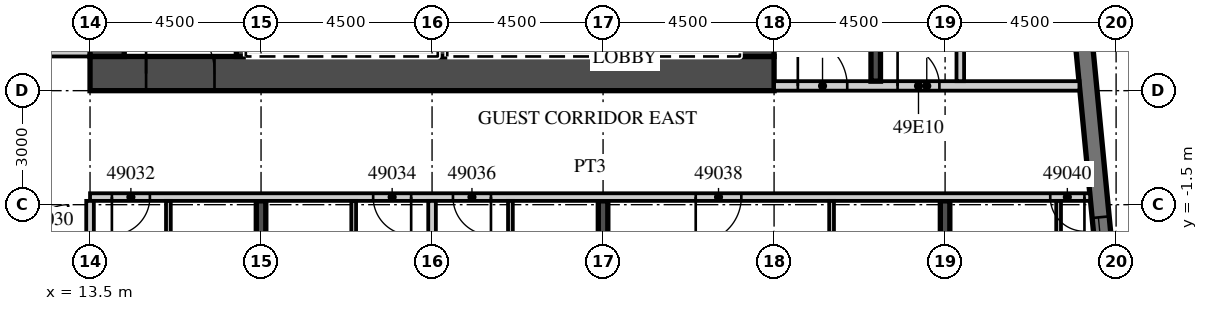
"""IFC4 building model, lengths in metres.
Left out: names, types, materials, properties, quantities, classifications, styles, units other than length and angle.
Written with IfcOpenShell. Run it as: python <this file> out.ifc"""

import sys

from ifc_helpers import new_model, si_unit, direction, frame, frame_2d, origin, place, context, subcontext, project, spatial, rectangle, extrude, element, fill, save


model = new_model("IFC4")
c1 = context("Model", 3, precision=1e-05, world=origin(), true_north=direction((0.0, 1.0)))
c2 = subcontext(c1, "Body", "Model", "MODEL_VIEW")
j1 = project(units=[si_unit("LENGTHUNIT", "METRE"), si_unit("PLANEANGLEUNIT", "RADIAN")], contexts=[c1])
p1 = place(None, origin())
s1 = spatial("IfcSite", under=j1, at=p1, CompositionType="ELEMENT")
p2 = place(p1, origin())
s2 = spatial("IfcBuilding", under=s1, at=p2, CompositionType="ELEMENT")
p3 = place(p2, frame((0.0, 0.0, 203.2)))
s3 = spatial("IfcBuildingStorey", under=s2, at=p3, CompositionType="ELEMENT", Elevation=203.2)
p4 = place(p3, frame((18.0, -19.245, 0.0), z_axis=(0.0, 0.0, 1.0), x_axis=(0.0, 1.0, 0.0)))
e1 = element("IfcWall", 1, at=p4, inside=s3, PredefinedType="SHEAR", context=c2, shape_type="SweptSolid", body=[
    extrude(rectangle(XDim=17.845, YDim=0.25, at=frame_2d((8.923, 0.0))), origin(), (0.0, 0.0, 1.0), 3.0),
])
p5 = place(p3, frame((27.0, -18.379, 0.0), z_axis=(0.0, 0.0, 1.0), x_axis=(0.0, 1.0, 0.0)))
e2 = element("IfcWall", 2, at=p5, inside=s3, PredefinedType="SHEAR", context=c2, shape_type="SweptSolid", body=[
    extrude(rectangle(XDim=16.979, YDim=0.25, at=frame_2d((8.489, 0.0))), origin(), (0.0, 0.0, 1.0), 3.0),
])
p6 = place(p3, frame((36.0, -17.512, 0.0), z_axis=(0.0, 0.0, 1.0), x_axis=(0.0, 1.0, 0.0)))
e3 = element("IfcWall", 3, at=p6, inside=s3, PredefinedType="SHEAR", context=c2, shape_type="SweptSolid", body=[
    extrude(rectangle(XDim=16.112, YDim=0.25, at=frame_2d((8.056, 0.0))), origin(), (0.0, 0.0, 1.0), 3.0),
])
p7 = place(p3, frame((41.214, -13.466, 0.0), z_axis=(0.0, 0.0, 1.0), x_axis=(-0.095847314626, 0.995396047952, 0.0)))
e4 = element("IfcWall", 4, at=p7, inside=s3, PredefinedType="SOLIDWALL", context=c2, shape_type="SweptSolid", body=[
    extrude(rectangle(XDim=34.0, YDim=0.45, at=frame_2d((17.0, 0.0))), origin(), (0.0, 0.0, 1.0), 3.0),
])
p8 = place(p7, frame((3.869, 0.0, 0.45)))
e5 = element("IfcOpeningElement", 5, at=p8, cuts=e4, PredefinedType="OPENING", context=c2, shape_type="SweptSolid", body=[
    extrude(rectangle(XDim=3.3, YDim=2.25, at=frame_2d((1.65, 1.125))), frame((0.0, 0.235, 0.0), z_axis=(0.0, -1.0, 0.0), x_axis=(1.0, 0.0, 0.0)), (0.0, 0.0, 1.0), 0.47),
])
p9 = place(p7, frame((8.39, 0.0, 0.45)))
e6 = element("IfcOpeningElement", 6, at=p9, cuts=e4, PredefinedType="OPENING", context=c2, shape_type="SweptSolid", body=[
    extrude(rectangle(XDim=3.3, YDim=2.25, at=frame_2d((1.65, 1.125))), frame((0.0, 0.235, 0.0), z_axis=(0.0, -1.0, 0.0), x_axis=(1.0, 0.0, 0.0)), (0.0, 0.0, 1.0), 0.47),
])
p10 = place(p3, frame((-13.5, 2.5, 0.0), z_axis=(0.0, 0.0, 1.0), x_axis=(1.0, 0.0, 0.0)))
e7 = element("IfcWall", 7, at=p10, inside=s3, PredefinedType="PARTITIONING", context=c2, shape_type="SweptSolid", body=[
    extrude(rectangle(XDim=27.0, YDim=0.2, at=frame_2d((13.5, 0.0))), origin(), (0.0, 0.0, 1.0), 3.0),
])
p11 = place(p10, frame((2.925, 0.0, 0.0)))
e8 = element("IfcOpeningElement", 8, at=p11, cuts=e7, PredefinedType="OPENING", context=c2, shape_type="SweptSolid", body=[
    extrude(rectangle(XDim=1.0, YDim=2.1, at=frame_2d((0.5, 1.05))), frame((0.0, 0.11, 0.0), z_axis=(0.0, -1.0, 0.0), x_axis=(1.0, 0.0, 0.0)), (0.0, 0.0, 1.0), 0.22),
])
p12 = place(p10, frame((9.863, 0.0, 0.0)))
e9 = element("IfcOpeningElement", 9, at=p12, cuts=e7, PredefinedType="OPENING", context=c2, shape_type="SweptSolid", body=[
    extrude(rectangle(XDim=1.2, YDim=2.1, at=frame_2d((0.6, 1.05))), frame((0.0, 0.11, 0.0), z_axis=(0.0, -1.0, 0.0), x_axis=(1.0, 0.0, 0.0)), (0.0, 0.0, 1.0), 0.22),
])
p13 = place(p10, frame((15.938, 0.0, 0.0)))
e10 = element("IfcOpeningElement", 10, at=p13, cuts=e7, PredefinedType="OPENING", context=c2, shape_type="SweptSolid", body=[
    extrude(rectangle(XDim=1.2, YDim=2.1, at=frame_2d((0.6, 1.05))), frame((0.0, 0.11, 0.0), z_axis=(0.0, -1.0, 0.0), x_axis=(1.0, 0.0, 0.0)), (0.0, 0.0, 1.0), 0.22),
])
p14 = place(p10, frame((23.075, 0.0, 0.0)))
e11 = element("IfcOpeningElement", 11, at=p14, cuts=e7, PredefinedType="OPENING", context=c2, shape_type="SweptSolid", body=[
    extrude(rectangle(XDim=1.0, YDim=2.1, at=frame_2d((0.5, 1.05))), frame((0.0, 0.11, 0.0), z_axis=(0.0, -1.0, 0.0), x_axis=(1.0, 0.0, 0.0)), (0.0, 0.0, 1.0), 0.22),
])
p15 = place(p3, frame((13.5, -1.3, 0.0), z_axis=(0.0, 0.0, 1.0), x_axis=(1.0, 0.0, 0.0)))
e12 = element("IfcWall", 12, at=p15, inside=s3, PredefinedType="PARTITIONING", context=c2, shape_type="SweptSolid", body=[
    extrude(rectangle(XDim=26.317, YDim=0.2, at=frame_2d((13.158, 0.0))), origin(), (0.0, 0.0, 1.0), 3.0),
])
p16 = place(p15, frame((0.575, 0.0, 0.0)))
e13 = element("IfcOpeningElement", 13, at=p16, cuts=e12, PredefinedType="OPENING", context=c2, shape_type="SweptSolid", body=[
    extrude(rectangle(XDim=1.0, YDim=2.1, at=frame_2d((0.5, 1.05))), frame((0.0, 0.11, 0.0), z_axis=(0.0, -1.0, 0.0), x_axis=(1.0, 0.0, 0.0)), (0.0, 0.0, 1.0), 0.22),
])
p17 = place(p15, frame((7.45, 0.0, 0.0)))
e14 = element("IfcOpeningElement", 14, at=p17, cuts=e12, PredefinedType="OPENING", context=c2, shape_type="SweptSolid", body=[
    extrude(rectangle(XDim=1.0, YDim=2.1, at=frame_2d((0.5, 1.05))), frame((0.0, 0.11, 0.0), z_axis=(0.0, -1.0, 0.0), x_axis=(1.0, 0.0, 0.0)), (0.0, 0.0, 1.0), 0.22),
])
p18 = place(p15, frame((9.55, 0.0, 0.0)))
e15 = element("IfcOpeningElement", 15, at=p18, cuts=e12, PredefinedType="OPENING", context=c2, shape_type="SweptSolid", body=[
    extrude(rectangle(XDim=1.0, YDim=2.1, at=frame_2d((0.5, 1.05))), frame((0.0, 0.11, 0.0), z_axis=(0.0, -1.0, 0.0), x_axis=(1.0, 0.0, 0.0)), (0.0, 0.0, 1.0), 0.22),
])
p19 = place(p15, frame((15.938, 0.0, 0.0)))
e16 = element("IfcOpeningElement", 16, at=p19, cuts=e12, PredefinedType="OPENING", context=c2, shape_type="SweptSolid", body=[
    extrude(rectangle(XDim=1.2, YDim=2.1, at=frame_2d((0.6, 1.05))), frame((0.0, 0.11, 0.0), z_axis=(0.0, -1.0, 0.0), x_axis=(1.0, 0.0, 0.0)), (0.0, 0.0, 1.0), 0.22),
])
p20 = place(p15, frame((25.267, 0.0, 0.0)))
e17 = element("IfcOpeningElement", 17, at=p20, cuts=e12, PredefinedType="OPENING", context=c2, shape_type="SweptSolid", body=[
    extrude(rectangle(XDim=0.9, YDim=2.1, at=frame_2d((0.45, 1.05))), frame((0.0, 0.11, 0.0), z_axis=(0.0, -1.0, 0.0), x_axis=(1.0, 0.0, 0.0)), (0.0, 0.0, 1.0), 0.22),
])
p21 = place(p3, frame((13.5, -19.701, 0.0), z_axis=(0.0, 0.0, 1.0), x_axis=(0.0, 1.0, 0.0)))
e18 = element("IfcWall", 18, at=p21, inside=s3, PredefinedType="PARTITIONING", context=c2, shape_type="SweptSolid", body=[
    extrude(rectangle(XDim=18.301, YDim=0.2, at=frame_2d((9.15, 0.0))), origin(), (0.0, 0.0, 1.0), 3.0),
])
p22 = place(p3, frame((15.562, -9.125, 0.0), z_axis=(0.0, 0.0, 1.0), x_axis=(0.0, 1.0, 0.0)))
e19 = element("IfcWall", 19, at=p22, inside=s3, PredefinedType="PARTITIONING", context=c2, shape_type="SweptSolid", body=[
    extrude(rectangle(XDim=7.725, YDim=0.125, at=frame_2d((3.863, 0.0))), origin(), (0.0, 0.0, 1.0), 3.0),
])
p23 = place(p22, frame((4.375, 0.0, 0.0)))
e20 = element("IfcOpeningElement", 20, at=p23, cuts=e19, PredefinedType="OPENING", context=c2, shape_type="SweptSolid", body=[
    extrude(rectangle(XDim=0.9, YDim=2.1, at=frame_2d((0.45, 1.05))), frame((0.0, 0.073, 0.0), z_axis=(0.0, -1.0, 0.0), x_axis=(1.0, 0.0, 0.0)), (0.0, 0.0, 1.0), 0.145),
])
p24 = place(p3, frame((22.5, -18.834, 0.0), z_axis=(0.0, 0.0, 1.0), x_axis=(0.0, 1.0, 0.0)))
e21 = element("IfcWall", 21, at=p24, inside=s3, PredefinedType="PARTITIONING", context=c2, shape_type="SweptSolid", body=[
    extrude(rectangle(XDim=17.434, YDim=0.2, at=frame_2d((8.717, 0.0))), origin(), (0.0, 0.0, 1.0), 3.0),
])
p25 = place(p3, frame((20.438, -9.125, 0.0), z_axis=(0.0, 0.0, 1.0), x_axis=(0.0, 1.0, 0.0)))
e22 = element("IfcWall", 22, at=p25, inside=s3, PredefinedType="PARTITIONING", context=c2, shape_type="SweptSolid", body=[
    extrude(rectangle(XDim=7.725, YDim=0.125, at=frame_2d((3.863, 0.0))), origin(), (0.0, 0.0, 1.0), 3.0),
])
p26 = place(p25, frame((4.375, 0.0, 0.0)))
e23 = element("IfcOpeningElement", 23, at=p26, cuts=e22, PredefinedType="OPENING", context=c2, shape_type="SweptSolid", body=[
    extrude(rectangle(XDim=0.9, YDim=2.1, at=frame_2d((0.45, 1.05))), frame((0.0, 0.073, 0.0), z_axis=(0.0, -1.0, 0.0), x_axis=(1.0, 0.0, 0.0)), (0.0, 0.0, 1.0), 0.145),
])
p27 = place(p3, frame((24.562, -9.125, 0.0), z_axis=(0.0, 0.0, 1.0), x_axis=(0.0, 1.0, 0.0)))
e24 = element("IfcWall", 24, at=p27, inside=s3, PredefinedType="PARTITIONING", context=c2, shape_type="SweptSolid", body=[
    extrude(rectangle(XDim=7.725, YDim=0.125, at=frame_2d((3.863, 0.0))), origin(), (0.0, 0.0, 1.0), 3.0),
])
p28 = place(p27, frame((4.375, 0.0, 0.0)))
e25 = element("IfcOpeningElement", 25, at=p28, cuts=e24, PredefinedType="OPENING", context=c2, shape_type="SweptSolid", body=[
    extrude(rectangle(XDim=0.9, YDim=2.1, at=frame_2d((0.45, 1.05))), frame((0.0, 0.073, 0.0), z_axis=(0.0, -1.0, 0.0), x_axis=(1.0, 0.0, 0.0)), (0.0, 0.0, 1.0), 0.145),
])
p29 = place(p3, frame((33.013, -9.125, 0.0), z_axis=(0.0, 0.0, 1.0), x_axis=(0.0, 1.0, 0.0)))
e26 = element("IfcWall", 26, at=p29, inside=s3, PredefinedType="PARTITIONING", context=c2, shape_type="SweptSolid", body=[
    extrude(rectangle(XDim=7.725, YDim=0.125, at=frame_2d((3.863, 0.0))), origin(), (0.0, 0.0, 1.0), 3.0),
])
p30 = place(p29, frame((4.375, 0.0, 0.0)))
e27 = element("IfcOpeningElement", 27, at=p30, cuts=e26, PredefinedType="OPENING", context=c2, shape_type="SweptSolid", body=[
    extrude(rectangle(XDim=0.9, YDim=2.1, at=frame_2d((0.45, 1.05))), frame((0.0, 0.073, 0.0), z_axis=(0.0, -1.0, 0.0), x_axis=(1.0, 0.0, 0.0)), (0.0, 0.0, 1.0), 0.145),
])
p31 = place(p3, frame((38.987, -6.445, 0.0), z_axis=(0.0, 0.0, 1.0), x_axis=(0.0, 1.0, 0.0)))
e28 = element("IfcWall", 28, at=p31, inside=s3, PredefinedType="PARTITIONING", context=c2, shape_type="SweptSolid", body=[
    extrude(rectangle(XDim=5.045, YDim=0.125, at=frame_2d((2.522, 0.0))), origin(), (0.0, 0.0, 1.0), 3.0),
])
p32 = place(p31, frame((1.695, 0.0, 0.0)))
e29 = element("IfcOpeningElement", 29, at=p32, cuts=e28, PredefinedType="OPENING", context=c2, shape_type="SweptSolid", body=[
    extrude(rectangle(XDim=0.9, YDim=2.1, at=frame_2d((0.45, 1.05))), frame((0.0, 0.073, 0.0), z_axis=(0.0, -1.0, 0.0), x_axis=(1.0, 0.0, 0.0)), (0.0, 0.0, 1.0), 0.145),
])
p33 = place(p3, frame((13.5, 1.95, 0.0), z_axis=(0.0, 0.0, 1.0), x_axis=(1.0, 0.0, 0.0)))
e30 = element("IfcWall", 30, at=p33, inside=s3, PredefinedType="SHEAR", context=c2, shape_type="SweptSolid", body=[
    extrude(rectangle(XDim=18.0, YDim=0.9, at=frame_2d((9.0, 0.0))), origin(), (0.0, 0.0, 1.0), 3.0),
])
p34 = place(p33, frame((1.475, 0.0, 0.0)))
e31 = element("IfcOpeningElement", 31, at=p34, cuts=e30, PredefinedType="OPENING", context=c2, shape_type="SweptSolid", body=[
    extrude(rectangle(XDim=1.8, YDim=2.1, at=frame_2d((0.9, 1.05))), frame((0.0, 0.46, 0.0), z_axis=(0.0, -1.0, 0.0), x_axis=(1.0, 0.0, 0.0)), (0.0, 0.0, 1.0), 0.92),
])
p35 = place(p3, frame((31.05, 2.4, 0.0), z_axis=(0.0, 0.0, 1.0), x_axis=(0.0, 1.0, 0.0)))
e32 = element("IfcWall", 32, at=p35, inside=s3, PredefinedType="SHEAR", context=c2, shape_type="SweptSolid", body=[
    extrude(rectangle(XDim=12.8, YDim=0.9, at=frame_2d((6.4, 0.0))), origin(), (0.0, 0.0, 1.0), 3.0),
])
p36 = place(p35, frame((0.2, 0.0, 0.0)))
e33 = element("IfcOpeningElement", 33, at=p36, cuts=e32, PredefinedType="OPENING", context=c2, shape_type="SweptSolid", body=[
    extrude(rectangle(XDim=1.1, YDim=2.1, at=frame_2d((0.55, 1.05))), frame((0.0, 0.46, 0.0), z_axis=(0.0, -1.0, 0.0), x_axis=(1.0, 0.0, 0.0)), (0.0, 0.0, 1.0), 0.92),
])
p37 = place(p3, frame((13.95, 2.4, 0.0), z_axis=(0.0, 0.0, 1.0), x_axis=(0.0, 1.0, 0.0)))
e34 = element("IfcWall", 34, at=p37, inside=s3, PredefinedType="SHEAR", context=c2, shape_type="SweptSolid", body=[
    extrude(rectangle(XDim=12.2, YDim=0.9, at=frame_2d((6.1, 0.0))), origin(), (0.0, 0.0, 1.0), 3.0),
])
p38 = place(p3, frame((17.475, 2.4, 0.0), z_axis=(0.0, 0.0, 1.0), x_axis=(0.0, 1.0, 0.0)))
e35 = element("IfcWall", 35, at=p38, inside=s3, PredefinedType="SHEAR", context=c2, shape_type="SweptSolid", body=[
    extrude(rectangle(XDim=3.15, YDim=0.25, at=frame_2d((1.575, 0.0))), origin(), (0.0, 0.0, 1.0), 3.0),
])
for number, where, z_axis, x_axis in (
    (36, (27.975, 2.4, 0.0), (0.0, 0.0, 1.0), (0.0, 1.0, 0.0)),
    (37, (22.775, 2.4, 0.0), (0.0, 0.0, 1.0), (0.0, 1.0, 0.0)),
):
    element("IfcWall", number, at=place(p3, frame(where, z_axis=z_axis, x_axis=x_axis)), inside=s3, PredefinedType="SHEAR", context=c2, shape_type="SweptSolid", body=[
        extrude(rectangle(XDim=2.9, YDim=0.25, at=frame_2d((1.45, 0.0))), origin(), (0.0, 0.0, 1.0), 3.0),
    ])
p39 = place(p3, frame((31.5, 1.625, 0.0), z_axis=(0.0, 0.0, 1.0), x_axis=(1.0, 0.0, 0.0)))
e38 = element("IfcWall", 38, at=p39, inside=s3, PredefinedType="PARTITIONING", context=c2, shape_type="SweptSolid", body=[
    extrude(rectangle(XDim=8.035, YDim=0.25, at=frame_2d((4.018, 0.0))), origin(), (0.0, 0.0, 1.0), 3.0),
])
p40 = place(p39, frame((0.625, 0.0, 0.0)))
e39 = element("IfcOpeningElement", 39, at=p40, cuts=e38, PredefinedType="OPENING", context=c2, shape_type="SweptSolid", body=[
    extrude(rectangle(XDim=1.3, YDim=2.1, at=frame_2d((0.65, 1.05))), frame((0.0, 0.135, 0.0), z_axis=(0.0, -1.0, 0.0), x_axis=(1.0, 0.0, 0.0)), (0.0, 0.0, 1.0), 0.27),
])
p41 = place(p39, frame((3.25, 0.0, 0.0)))
e40 = element("IfcOpeningElement", 40, at=p41, cuts=e38, PredefinedType="OPENING", context=c2, shape_type="SweptSolid", body=[
    extrude(rectangle(XDim=1.1, YDim=2.1, at=frame_2d((0.55, 1.05))), frame((0.0, 0.135, 0.0), z_axis=(0.0, -1.0, 0.0), x_axis=(1.0, 0.0, 0.0)), (0.0, 0.0, 1.0), 0.27),
])
p42 = place(p3, frame((34.175, 1.75, 0.0), z_axis=(0.0, 0.0, 1.0), x_axis=(0.0, 1.0, 0.0)))
e41 = element("IfcWall", 41, at=p42, inside=s3, PredefinedType="SHEAR", context=c2, shape_type="SweptSolid", body=[
    extrude(rectangle(XDim=8.35, YDim=0.25, at=frame_2d((4.175, 0.0))), origin(), (0.0, 0.0, 1.0), 3.0),
])
p43 = place(p3, frame((36.4, 1.75, 0.0), z_axis=(0.0, 0.0, 1.0), x_axis=(0.0, 1.0, 0.0)))
e42 = element("IfcWall", 42, at=p43, inside=s3, PredefinedType="PARTITIONING", context=c2, shape_type="SweptSolid", body=[
    extrude(rectangle(XDim=15.95, YDim=0.2, at=frame_2d((7.975, 0.0))), origin(), (0.0, 0.0, 1.0), 3.0),
])
p44 = place(p43, frame((14.7, 0.0, 0.0)))
e43 = element("IfcOpeningElement", 43, at=p44, cuts=e42, PredefinedType="OPENING", context=c2, shape_type="SweptSolid", body=[
    extrude(rectangle(XDim=0.9, YDim=2.1, at=frame_2d((0.45, 1.05))), frame((0.0, 0.11, 0.0), z_axis=(0.0, -1.0, 0.0), x_axis=(1.0, 0.0, 0.0)), (0.0, 0.0, 1.0), 0.22),
])
p45 = place(p9, origin())
e44 = element("IfcWindow", 44, at=p45, inside=s3, PartitioningType="SINGLE_PANEL", PredefinedType="WINDOW", context=c2, shape_type="SweptSolid", body=[
    extrude(rectangle(XDim=3.3, YDim=2.25, at=frame_2d((1.65, 1.125))), frame((0.0, 0.09, 0.0), z_axis=(0.0, -1.0, 0.0), x_axis=(1.0, 0.0, 0.0)), (0.0, 0.0, 1.0), 0.06),
])
fill(e6, e44)
p46 = place(p16, origin())
e45 = element("IfcDoor", 45, at=p46, inside=s3, OperationType="SINGLE_SWING_LEFT", PredefinedType="DOOR", context=c2, shape_type="SweptSolid", body=[
    extrude(rectangle(XDim=1.0, YDim=2.1, at=frame_2d((0.5, 1.05))), frame((0.0, 0.025, 0.0), z_axis=(0.0, -1.0, 0.0), x_axis=(1.0, 0.0, 0.0)), (0.0, 0.0, 1.0), 0.05),
])
fill(e13, e45)
p47 = place(p17, origin())
e46 = element("IfcDoor", 46, at=p47, inside=s3, OperationType="SINGLE_SWING_RIGHT", PredefinedType="DOOR", context=c2, shape_type="SweptSolid", body=[
    extrude(rectangle(XDim=1.0, YDim=2.1, at=frame_2d((0.5, 1.05))), frame((0.0, 0.025, 0.0), z_axis=(0.0, -1.0, 0.0), x_axis=(1.0, 0.0, 0.0)), (0.0, 0.0, 1.0), 0.05),
])
fill(e14, e46)
p48 = place(p18, origin())
e47 = element("IfcDoor", 47, at=p48, inside=s3, OperationType="SINGLE_SWING_RIGHT", PredefinedType="DOOR", context=c2, shape_type="SweptSolid", body=[
    extrude(rectangle(XDim=1.0, YDim=2.1, at=frame_2d((0.5, 1.05))), frame((0.0, 0.025, 0.0), z_axis=(0.0, -1.0, 0.0), x_axis=(1.0, 0.0, 0.0)), (0.0, 0.0, 1.0), 0.05),
])
fill(e15, e47)
p49 = place(p19, origin())
e48 = element("IfcDoor", 48, at=p49, inside=s3, OperationType="SINGLE_SWING_LEFT", PredefinedType="DOOR", context=c2, shape_type="SweptSolid", body=[
    extrude(rectangle(XDim=1.2, YDim=2.1, at=frame_2d((0.6, 1.05))), frame((0.0, 0.025, 0.0), z_axis=(0.0, -1.0, 0.0), x_axis=(1.0, 0.0, 0.0)), (0.0, 0.0, 1.0), 0.05),
])
fill(e16, e48)
p50 = place(p20, origin())
e49 = element("IfcDoor", 49, at=p50, inside=s3, OperationType="SINGLE_SWING_RIGHT", PredefinedType="DOOR", context=c2, shape_type="SweptSolid", body=[
    extrude(rectangle(XDim=0.9, YDim=2.1, at=frame_2d((0.45, 1.05))), frame((0.0, 0.025, 0.0), z_axis=(0.0, -1.0, 0.0), x_axis=(1.0, 0.0, 0.0)), (0.0, 0.0, 1.0), 0.05),
])
fill(e17, e49)
p51 = place(p34, origin())
e50 = element("IfcDoor", 50, at=p51, inside=s3, OperationType="DOUBLE_DOOR_DOUBLE_SWING", PredefinedType="DOOR", context=c2, shape_type="SweptSolid", body=[
    extrude(rectangle(XDim=1.8, YDim=2.1, at=frame_2d((0.9, 1.05))), frame((0.0, 0.025, 0.0), z_axis=(0.0, -1.0, 0.0), x_axis=(1.0, 0.0, 0.0)), (0.0, 0.0, 1.0), 0.05),
])
fill(e31, e50)
p52 = place(p40, origin())
e51 = element("IfcDoor", 51, at=p52, inside=s3, OperationType="SINGLE_SWING_LEFT", PredefinedType="DOOR", context=c2, shape_type="SweptSolid", body=[
    extrude(rectangle(XDim=1.3, YDim=2.1, at=frame_2d((0.65, 1.05))), frame((0.0, 0.025, 0.0), z_axis=(0.0, -1.0, 0.0), x_axis=(1.0, 0.0, 0.0)), (0.0, 0.0, 1.0), 0.05),
])
fill(e39, e51)
p53 = place(p41, origin())
e52 = element("IfcDoor", 52, at=p53, inside=s3, OperationType="SINGLE_SWING_LEFT", PredefinedType="DOOR", context=c2, shape_type="SweptSolid", body=[
    extrude(rectangle(XDim=1.1, YDim=2.1, at=frame_2d((0.55, 1.05))), frame((0.0, 0.025, 0.0), z_axis=(0.0, -1.0, 0.0), x_axis=(1.0, 0.0, 0.0)), (0.0, 0.0, 1.0), 0.05),
])
fill(e40, e52)
save(model, sys.argv[1])
